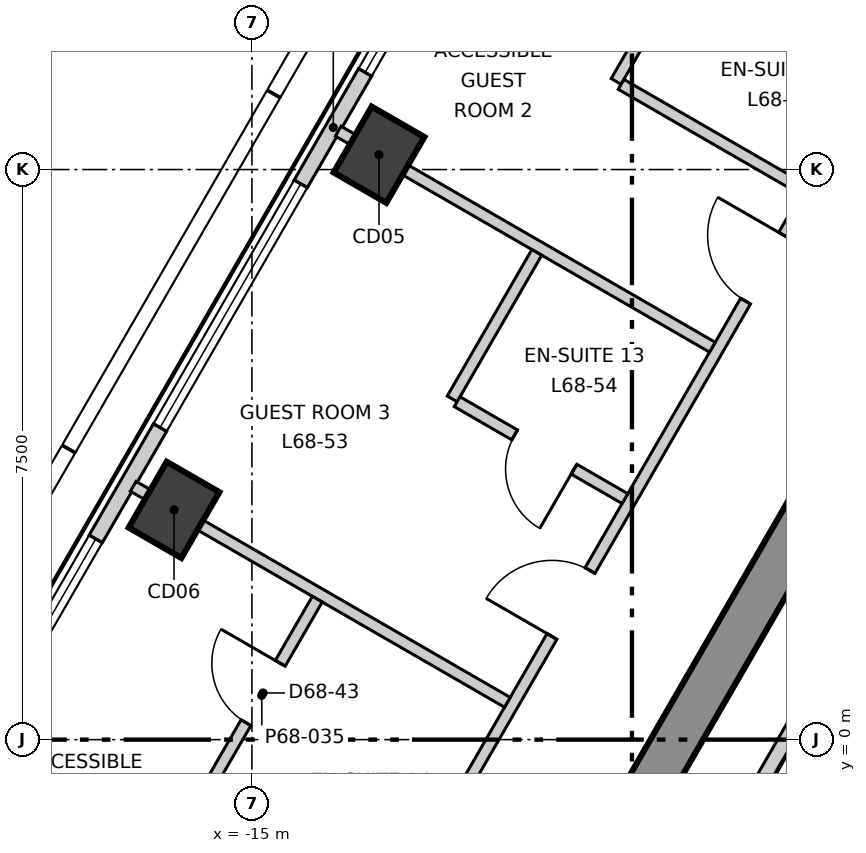
"""IFC4 building model, lengths in metres.
Left out: names, types, materials, properties, quantities, classifications, styles, units other than length and angle.
Written with IfcOpenShell. Run it as: python <this file> out.ifc"""

import sys

from ifc_helpers import new_model, si_unit, direction, frame, frame_2d, origin, origin_2d, place, context, subcontext, project, spatial, polyline, rectangle, outline, extrude, element, fill, save


model = new_model("IFC4")
c1 = context("Model", 3, precision=1e-05, world=origin(), true_north=direction((0.0, 1.0)))
c2 = subcontext(c1, "Body", "Model", "MODEL_VIEW")
j1 = project(units=[si_unit("LENGTHUNIT", "METRE"), si_unit("PLANEANGLEUNIT", "RADIAN")], contexts=[c1])
p1 = place(None, origin())
s1 = spatial("IfcSite", under=j1, at=p1, CompositionType="ELEMENT")
p2 = place(p1, origin())
s2 = spatial("IfcBuilding", under=s1, at=p2, CompositionType="ELEMENT")
p3 = place(p2, frame((0.0, 0.0, 289.9)))
s3 = spatial("IfcBuildingStorey", under=s2, at=p3, CompositionType="ELEMENT", Elevation=289.9)
p4 = place(p3, frame((-1.732, 13.3, -0.3), z_axis=(0.0, 0.0, 1.0), x_axis=(-0.500000539815, -0.866025092122, 0.0)))
e1 = element("IfcWall", 1, at=p4, inside=s3, PredefinedType="SHEAR", context=c2, shape_type="SweptSolid", body=[
    extrude(outline(polyline([(-0.173, -0.3), (1.795, -0.3), (3.763, -0.3), (5.732, -0.3), (7.7, -0.3), (9.668, -0.301), (11.637, -0.301), (13.605, -0.301), (15.573, -0.301), (17.542, -0.301), (19.51, -0.301), (21.478, -0.301), (21.131, 0.3), (19.226, 0.3), (17.321, 0.3), (15.415, 0.3), (13.51, 0.3), (11.605, 0.3), (9.699, 0.3), (7.794, 0.3), (5.889, 0.3), (3.984, 0.3), (2.078, 0.3), (0.173, 0.3), (-0.173, -0.3)])), origin(), (0.0, 0.0, 1.0), 3.6),
])
p5 = place(p4, frame((10.102, 0.0, 0.3)))
e2 = element("IfcOpeningElement", 2, at=p5, cuts=e1, PredefinedType="OPENING", context=c2, shape_type="SweptSolid", body=[
    extrude(rectangle(XDim=1.1, YDim=2.1, at=frame_2d((0.55, 1.05))), frame((0.0, 0.31, 0.0), z_axis=(0.0, -1.0, 0.0), x_axis=(1.0, 0.0, 0.0)), (0.0, 0.0, 1.0), 0.621),
])
p6 = place(p4, frame((16.328, 0.0, 0.3)))
e3 = element("IfcOpeningElement", 3, at=p6, cuts=e1, PredefinedType="OPENING", context=c2, shape_type="SweptSolid", body=[
    extrude(rectangle(XDim=1.0, YDim=2.1, at=frame_2d((0.5, 1.05))), frame((0.0, 0.31, 0.0), z_axis=(0.0, -1.0, 0.0), x_axis=(1.0, 0.0, 0.0)), (0.0, 0.0, 1.0), 0.621),
])
p7 = place(p4, frame((4.777, 0.0, 0.3)))
e4 = element("IfcOpeningElement", 4, at=p7, cuts=e1, PredefinedType="OPENING", context=c2, shape_type="SweptSolid", body=[
    extrude(rectangle(XDim=0.9, YDim=2.1, at=frame_2d((0.45, 1.05))), frame((0.0, 0.31, 0.0), z_axis=(0.0, -1.0, 0.0), x_axis=(1.0, 0.0, 0.0)), (0.0, 0.0, 1.0), 0.621),
])
for number, where, z_axis, x_axis in (
    (5, (-13.328, 7.695, -0.3), (0.0, 0.0, 1.0), (0.5, 0.866, 0.0)),
    (6, (-16.025, 3.023, -0.3), (0.0, 0.0, 1.0), (0.5, 0.866, 0.0)),
):
    element("IfcColumn", number, at=place(p3, frame(where, z_axis=z_axis, x_axis=x_axis)), inside=s3, PredefinedType="COLUMN", context=c2, shape_type="SweptSolid", body=[
        extrude(rectangle(XDim=1.0, YDim=0.8, at=origin_2d()), origin(), (0.0, 0.0, 1.0), 3.6),
    ])
p8 = place(p3, frame((-2.494, 27.86, 0.0), z_axis=(0.0, 0.0, 1.0), x_axis=(-0.500008134474, -0.866020707292, 0.0)))
e7 = element("IfcWall", 7, at=p8, inside=s3, PredefinedType="ELEMENTEDWALL", context=c2, shape_type="SweptSolid", body=[
    extrude(rectangle(XDim=45.741, YDim=0.2, at=frame_2d((22.871, 0.0))), origin(), (0.0, 0.0, 1.0), 3.3),
])
p9 = place(p8, frame((2.15, 0.0, 0.9)))
e8 = element("IfcOpeningElement", 8, at=p9, cuts=e7, PredefinedType="OPENING", context=c2, shape_type="SweptSolid", body=[
    extrude(rectangle(XDim=3.7, YDim=2.2, at=frame_2d((1.85, 1.1))), frame((0.0, 0.11, 0.0), z_axis=(0.0, -1.0, 0.0), x_axis=(1.0, 0.0, 0.0)), (0.0, 0.0, 1.0), 0.22),
])
p10 = place(p8, frame((7.544, 0.0, 0.9)))
e9 = element("IfcOpeningElement", 9, at=p10, cuts=e7, PredefinedType="OPENING", context=c2, shape_type="SweptSolid", body=[
    extrude(rectangle(XDim=3.7, YDim=2.2, at=frame_2d((1.85, 1.1))), frame((0.0, 0.11, 0.0), z_axis=(0.0, -1.0, 0.0), x_axis=(1.0, 0.0, 0.0)), (0.0, 0.0, 1.0), 0.22),
])
p11 = place(p8, frame((12.939, 0.0, 0.9)))
e10 = element("IfcOpeningElement", 10, at=p11, cuts=e7, PredefinedType="OPENING", context=c2, shape_type="SweptSolid", body=[
    extrude(rectangle(XDim=3.7, YDim=2.2, at=frame_2d((1.85, 1.1))), frame((0.0, 0.11, 0.0), z_axis=(0.0, -1.0, 0.0), x_axis=(1.0, 0.0, 0.0)), (0.0, 0.0, 1.0), 0.22),
])
p12 = place(p8, frame((18.333, 0.0, 0.9)))
e11 = element("IfcOpeningElement", 11, at=p12, cuts=e7, PredefinedType="OPENING", context=c2, shape_type="SweptSolid", body=[
    extrude(rectangle(XDim=3.7, YDim=2.2, at=frame_2d((1.85, 1.1))), frame((0.0, 0.11, 0.0), z_axis=(0.0, -1.0, 0.0), x_axis=(1.0, 0.0, 0.0)), (0.0, 0.0, 1.0), 0.22),
])
p13 = place(p8, frame((23.728, 0.0, 0.9)))
e12 = element("IfcOpeningElement", 12, at=p13, cuts=e7, PredefinedType="OPENING", context=c2, shape_type="SweptSolid", body=[
    extrude(rectangle(XDim=3.7, YDim=2.2, at=frame_2d((1.85, 1.1))), frame((0.0, 0.11, 0.0), z_axis=(0.0, -1.0, 0.0), x_axis=(1.0, 0.0, 0.0)), (0.0, 0.0, 1.0), 0.22),
])
p14 = place(p8, frame((29.122, 0.0, 0.9)))
e13 = element("IfcOpeningElement", 13, at=p14, cuts=e7, PredefinedType="OPENING", context=c2, shape_type="SweptSolid", body=[
    extrude(rectangle(XDim=3.7, YDim=2.2, at=frame_2d((1.85, 1.1))), frame((0.0, 0.11, 0.0), z_axis=(0.0, -1.0, 0.0), x_axis=(1.0, 0.0, 0.0)), (0.0, 0.0, 1.0), 0.22),
])
p15 = place(p8, frame((34.517, 0.0, 0.9)))
e14 = element("IfcOpeningElement", 14, at=p15, cuts=e7, PredefinedType="OPENING", context=c2, shape_type="SweptSolid", body=[
    extrude(rectangle(XDim=3.7, YDim=2.2, at=frame_2d((1.85, 1.1))), frame((0.0, 0.11, 0.0), z_axis=(0.0, -1.0, 0.0), x_axis=(1.0, 0.0, 0.0)), (0.0, 0.0, 1.0), 0.22),
])
p16 = place(p8, frame((39.911, 0.0, 0.9)))
e15 = element("IfcOpeningElement", 15, at=p16, cuts=e7, PredefinedType="OPENING", context=c2, shape_type="SweptSolid", body=[
    extrude(rectangle(XDim=3.7, YDim=2.2, at=frame_2d((1.85, 1.1))), frame((0.0, 0.11, 0.0), z_axis=(0.0, -1.0, 0.0), x_axis=(1.0, 0.0, 0.0)), (0.0, 0.0, 1.0), 0.22),
])
p17 = place(p3, frame((-17.679, -10.12, 0.0), z_axis=(0.0, 0.0, 1.0), x_axis=(0.500008955215, 0.866020233427, 0.0)))
e16 = element("IfcWall", 16, at=p17, inside=s3, PredefinedType="PARTITIONING", context=c2, shape_type="SweptSolid", body=[
    extrude(rectangle(XDim=35.357, YDim=0.15, at=frame_2d((17.679, 0.0))), origin(), (0.0, 0.0, 1.0), 3.3),
])
p18 = place(p17, frame((31.407, 0.0, 0.0)))
e17 = element("IfcOpeningElement", 17, at=p18, cuts=e16, PredefinedType="OPENING", context=c2, shape_type="SweptSolid", body=[
    extrude(rectangle(XDim=1.0, YDim=2.1, at=frame_2d((0.5, 1.05))), frame((0.0, 0.085, 0.0), z_axis=(0.0, -1.0, 0.0), x_axis=(1.0, 0.0, 0.0)), (0.0, 0.0, 1.0), 0.17),
])
p19 = place(p17, frame((25.642, 0.0, 0.0)))
e18 = element("IfcOpeningElement", 18, at=p19, cuts=e16, PredefinedType="OPENING", context=c2, shape_type="SweptSolid", body=[
    extrude(rectangle(XDim=1.0, YDim=2.1, at=frame_2d((0.5, 1.05))), frame((0.0, 0.085, 0.0), z_axis=(0.0, -1.0, 0.0), x_axis=(1.0, 0.0, 0.0)), (0.0, 0.0, 1.0), 0.17),
])
p20 = place(p17, frame((18.348, 0.0, 0.0)))
e19 = element("IfcOpeningElement", 19, at=p20, cuts=e16, PredefinedType="OPENING", context=c2, shape_type="SweptSolid", body=[
    extrude(rectangle(XDim=1.0, YDim=2.1, at=frame_2d((0.5, 1.05))), frame((0.0, 0.085, 0.0), z_axis=(0.0, -1.0, 0.0), x_axis=(1.0, 0.0, 0.0)), (0.0, 0.0, 1.0), 0.17),
])
p21 = place(p17, frame((13.254, 0.0, 0.0)))
e20 = element("IfcOpeningElement", 20, at=p21, cuts=e16, PredefinedType="OPENING", context=c2, shape_type="SweptSolid", body=[
    extrude(rectangle(XDim=1.0, YDim=2.1, at=frame_2d((0.5, 1.05))), frame((0.0, 0.085, 0.0), z_axis=(0.0, -1.0, 0.0), x_axis=(1.0, 0.0, 0.0)), (0.0, 0.0, 1.0), 0.17),
])
p22 = place(p17, frame((7.559, 0.0, 0.0)))
e21 = element("IfcOpeningElement", 21, at=p22, cuts=e16, PredefinedType="OPENING", context=c2, shape_type="SweptSolid", body=[
    extrude(rectangle(XDim=1.0, YDim=2.1, at=frame_2d((0.5, 1.05))), frame((0.0, 0.085, 0.0), z_axis=(0.0, -1.0, 0.0), x_axis=(1.0, 0.0, 0.0)), (0.0, 0.0, 1.0), 0.17),
])
p23 = place(p17, frame((2.865, 0.0, 0.0)))
e22 = element("IfcOpeningElement", 22, at=p23, cuts=e16, PredefinedType="OPENING", context=c2, shape_type="SweptSolid", body=[
    extrude(rectangle(XDim=1.0, YDim=2.1, at=frame_2d((0.5, 1.05))), frame((0.0, 0.085, 0.0), z_axis=(0.0, -1.0, 0.0), x_axis=(1.0, 0.0, 0.0)), (0.0, 0.0, 1.0), 0.17),
])
p24 = place(p3, frame((-16.562, 3.333, 0.0), z_axis=(0.0, 0.0, 1.0), x_axis=(0.866048987239, -0.499959150034, 0.0)))
e23 = element("IfcWall", 23, at=p24, inside=s3, PredefinedType="PARTITIONING", context=c2, shape_type="SweptSolid", body=[
    extrude(rectangle(XDim=5.685, YDim=0.15, at=frame_2d((2.842, 0.0))), origin(), (0.0, 0.0, 1.0), 3.3),
])
p25 = place(p3, frame((-13.865, 8.005, 0.0), z_axis=(0.0, 0.0, 1.0), x_axis=(0.86606758311, -0.499926936147, 0.0)))
e24 = element("IfcWall", 24, at=p25, inside=s3, PredefinedType="PARTITIONING", context=c2, shape_type="SweptSolid", body=[
    extrude(rectangle(XDim=5.684, YDim=0.15, at=frame_2d((2.842, 0.0))), origin(), (0.0, 0.0, 1.0), 2.8),
])
p26 = place(p3, frame((-15.603, -0.685, 0.0), z_axis=(0.0, 0.0, 1.0), x_axis=(0.500187211558, 0.865917290158, 0.0)))
e25 = element("IfcWall", 25, at=p26, inside=s3, PredefinedType="PARTITIONING", context=c2, shape_type="SweptSolid", body=[
    extrude(rectangle(XDim=2.925, YDim=0.15, at=frame_2d((1.463, 0.0))), origin(), (0.0, 0.0, 1.0), 3.3),
])
p27 = place(p26, frame((1.05, 0.0, 0.0)))
e26 = element("IfcOpeningElement", 26, at=p27, cuts=e25, PredefinedType="OPENING", context=c2, shape_type="SweptSolid", body=[
    extrude(rectangle(XDim=0.9, YDim=2.1, at=frame_2d((0.45, 1.05))), frame((0.0, 0.085, 0.0), z_axis=(0.0, -1.0, 0.0), x_axis=(1.0, 0.0, 0.0)), (0.0, 0.0, 1.0), 0.17),
])
p28 = place(p3, frame((-10.208, 8.659, 0.0), z_axis=(0.0, 0.0, 1.0), x_axis=(0.499874209568, 0.866098016745, 0.0)))
e27 = element("IfcWall", 27, at=p28, inside=s3, PredefinedType="PARTITIONING", context=c2, shape_type="SweptSolid", body=[
    extrude(rectangle(XDim=2.925, YDim=0.15, at=frame_2d((1.462, 0.0))), origin(), (0.0, 0.0, 1.0), 3.3),
])
p29 = place(p28, frame((1.05, 0.0, 0.0)))
e28 = element("IfcOpeningElement", 28, at=p29, cuts=e27, PredefinedType="OPENING", context=c2, shape_type="SweptSolid", body=[
    extrude(rectangle(XDim=0.9, YDim=2.1, at=frame_2d((0.45, 1.05))), frame((0.0, 0.085, 0.0), z_axis=(0.0, -1.0, 0.0), x_axis=(1.0, 0.0, 0.0)), (0.0, 0.0, 1.0), 0.17),
])
p30 = place(p3, frame((-12.365, 4.483, 0.0), z_axis=(0.0, 0.0, 1.0), x_axis=(0.500162441854, 0.865931597621, 0.0)))
e29 = element("IfcWall", 29, at=p30, inside=s3, PredefinedType="PARTITIONING", context=c2, shape_type="SweptSolid", body=[
    extrude(rectangle(XDim=2.225, YDim=0.15, at=frame_2d((1.113, 0.0))), origin(), (0.0, 0.0, 1.0), 3.3),
])
p31 = place(p3, frame((-12.3, 4.446, 0.0), z_axis=(0.0, 0.0, 1.0), x_axis=(0.865965520905, -0.500103705848, 0.0)))
e30 = element("IfcWall", 30, at=p31, inside=s3, PredefinedType="PARTITIONING", context=c2, shape_type="SweptSolid", body=[
    extrude(rectangle(XDim=2.55, YDim=0.15, at=frame_2d((1.275, 0.0))), origin(), (0.0, 0.0, 1.0), 3.3),
])
p32 = place(p31, frame((0.875, 0.0, 0.0)))
e31 = element("IfcOpeningElement", 31, at=p32, cuts=e30, PredefinedType="OPENING", context=c2, shape_type="SweptSolid", body=[
    extrude(rectangle(XDim=0.9, YDim=2.1, at=frame_2d((0.45, 1.05))), frame((0.0, 0.085, 0.0), z_axis=(0.0, -1.0, 0.0), x_axis=(1.0, 0.0, 0.0)), (0.0, 0.0, 1.0), 0.17),
])
p33 = place(p3, frame((-10.143, 8.621, 0.0), z_axis=(0.0, 0.0, 1.0), x_axis=(0.866049104564, -0.499958946799, 0.0)))
e32 = element("IfcWall", 32, at=p33, inside=s3, PredefinedType="PARTITIONING", context=c2, shape_type="SweptSolid", body=[
    extrude(rectangle(XDim=2.77, YDim=0.15, at=frame_2d((1.385, 0.0))), origin(), (0.0, 0.0, 1.0), 3.3),
])
p34 = place(p3, frame((-8.326, -0.62, 0.0), z_axis=(0.0, 0.0, 1.0), x_axis=(0.500023687443, 0.866011727401, 0.0)))
e33 = element("IfcWall", 33, at=p34, inside=s3, PredefinedType="SOLIDWALL", context=c2, shape_type="SweptSolid", body=[
    extrude(rectangle(XDim=2.9, YDim=0.2, at=frame_2d((1.45, 0.0))), origin(), (0.0, 0.0, 1.0), 3.3),
])
p35 = place(p12, origin())
e34 = element("IfcWindow", 34, at=p35, inside=s3, PartitioningType="SINGLE_PANEL", PredefinedType="WINDOW", context=c2, shape_type="SweptSolid", body=[
    extrude(rectangle(XDim=3.7, YDim=2.2, at=frame_2d((1.85, 1.1))), frame((0.0, 0.03, 0.0), z_axis=(0.0, -1.0, 0.0), x_axis=(1.0, 0.0, 0.0)), (0.0, 0.0, 1.0), 0.06),
])
fill(e11, e34)
p36 = place(p13, origin())
e35 = element("IfcWindow", 35, at=p36, inside=s3, PartitioningType="SINGLE_PANEL", PredefinedType="WINDOW", context=c2, shape_type="SweptSolid", body=[
    extrude(rectangle(XDim=3.7, YDim=2.2, at=frame_2d((1.85, 1.1))), frame((0.0, 0.03, 0.0), z_axis=(0.0, -1.0, 0.0), x_axis=(1.0, 0.0, 0.0)), (0.0, 0.0, 1.0), 0.06),
])
fill(e12, e35)
p37 = place(p14, origin())
e36 = element("IfcWindow", 36, at=p37, inside=s3, PartitioningType="SINGLE_PANEL", PredefinedType="WINDOW", context=c2, shape_type="SweptSolid", body=[
    extrude(rectangle(XDim=3.7, YDim=2.2, at=frame_2d((1.85, 1.1))), frame((0.0, 0.03, 0.0), z_axis=(0.0, -1.0, 0.0), x_axis=(1.0, 0.0, 0.0)), (0.0, 0.0, 1.0), 0.06),
])
fill(e13, e36)
p38 = place(p20, origin())
e37 = element("IfcDoor", 37, at=p38, inside=s3, OperationType="SINGLE_SWING_LEFT", PredefinedType="DOOR", context=c2, shape_type="SweptSolid", body=[
    extrude(rectangle(XDim=1.0, YDim=2.1, at=frame_2d((0.5, 1.05))), frame((0.0, 0.025, 0.0), z_axis=(0.0, -1.0, 0.0), x_axis=(1.0, 0.0, 0.0)), (0.0, 0.0, 1.0), 0.05),
])
fill(e19, e37)
p39 = place(p21, origin())
e38 = element("IfcDoor", 38, at=p39, inside=s3, OperationType="SINGLE_SWING_RIGHT", PredefinedType="DOOR", context=c2, shape_type="SweptSolid", body=[
    extrude(rectangle(XDim=1.0, YDim=2.1, at=frame_2d((0.5, 1.05))), frame((0.0, 0.025, 0.0), z_axis=(0.0, -1.0, 0.0), x_axis=(1.0, 0.0, 0.0)), (0.0, 0.0, 1.0), 0.05),
])
fill(e20, e38)
p40 = place(p32, origin())
e39 = element("IfcDoor", 39, at=p40, inside=s3, OperationType="SINGLE_SWING_RIGHT", PredefinedType="DOOR", context=c2, shape_type="SweptSolid", body=[
    extrude(rectangle(XDim=0.9, YDim=2.1, at=frame_2d((0.45, 1.05))), frame((0.0, 0.025, 0.0), z_axis=(0.0, -1.0, 0.0), x_axis=(1.0, 0.0, 0.0)), (0.0, 0.0, 1.0), 0.05),
])
fill(e31, e39)
p41 = place(p27, origin())
e40 = element("IfcDoor", 40, at=p41, inside=s3, OperationType="SINGLE_SWING_LEFT", PredefinedType="DOOR", context=c2, shape_type="SweptSolid", body=[
    extrude(rectangle(XDim=0.9, YDim=2.1, at=frame_2d((0.45, 1.05))), frame((0.0, 0.025, 0.0), z_axis=(0.0, -1.0, 0.0), x_axis=(1.0, 0.0, 0.0)), (0.0, 0.0, 1.0), 0.05),
])
fill(e26, e40)
save(model, sys.argv[1])
